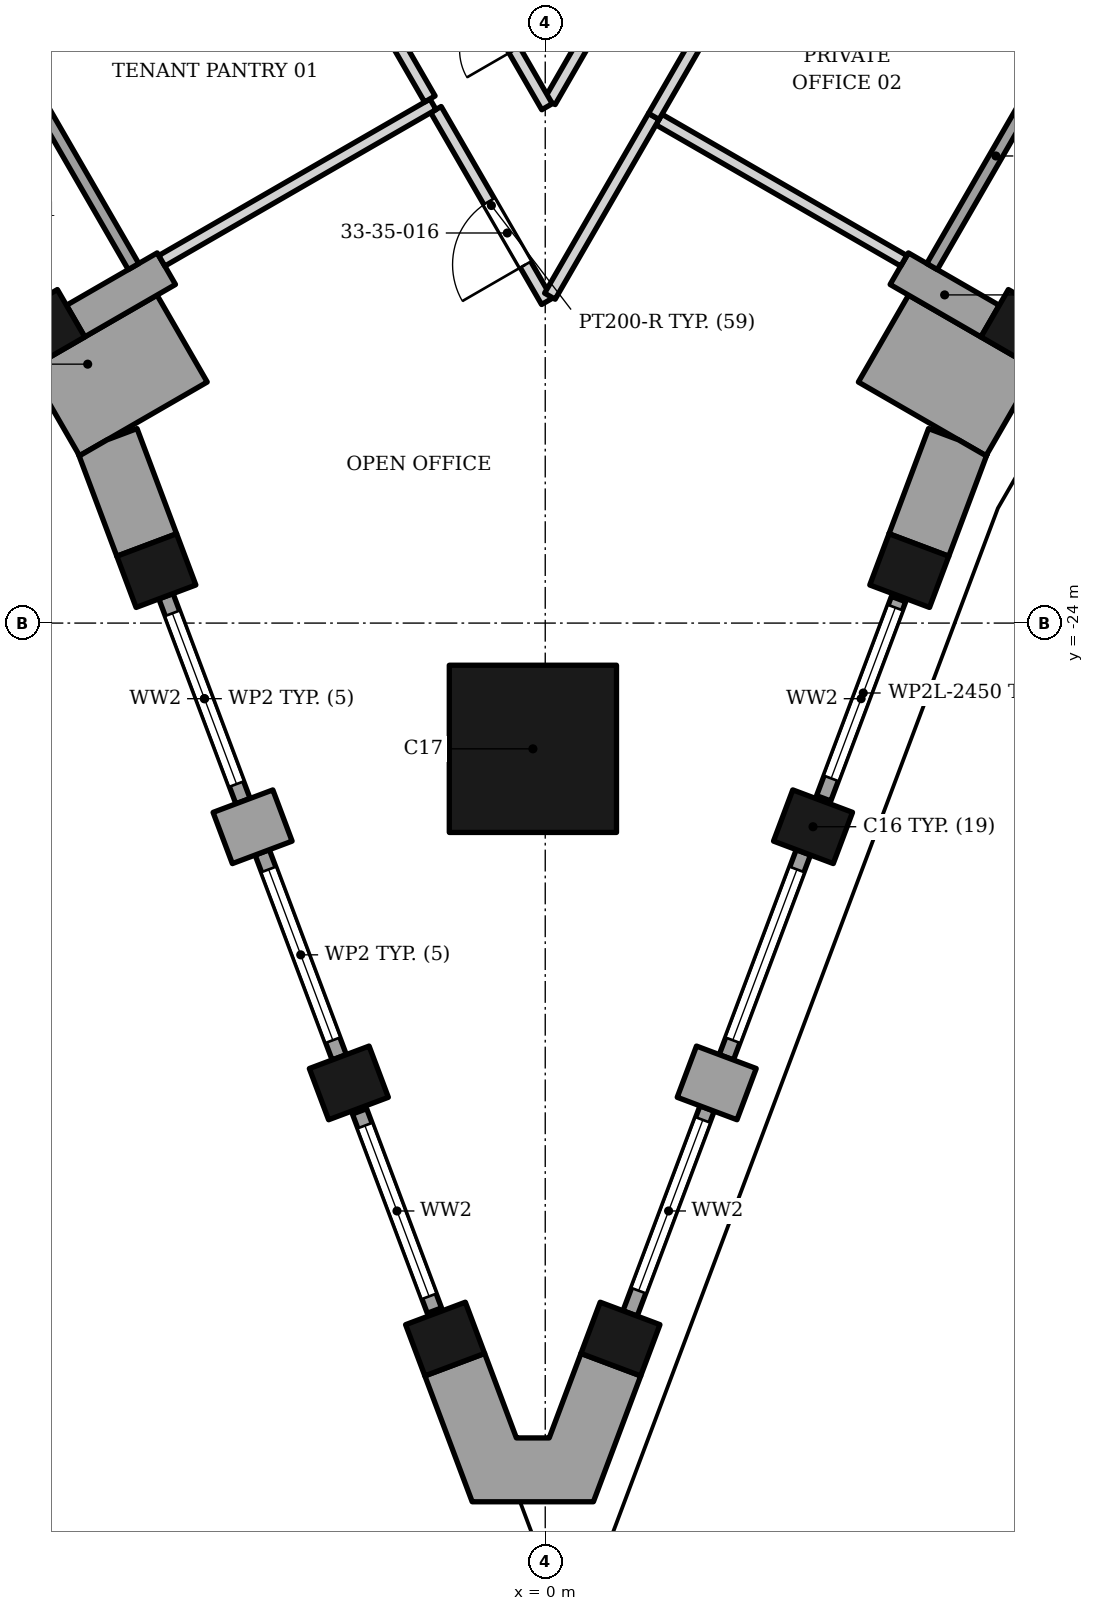
"""IFC4 building model, lengths in metres.
Left out: names, types, materials, properties, quantities, classifications, styles, units other than length and angle.
Written with IfcOpenShell. Run it as: python <this file> out.ifc"""

import sys

from ifc_helpers import new_model, si_unit, direction, frame, frame_2d, origin, origin_2d, place, context, subcontext, project, spatial, polyline, rectangle, outline, extrude, element, fill, save


model = new_model("IFC4")
c1 = context("Model", 3, precision=1e-05, world=origin(), true_north=direction((0.0, 1.0)))
c2 = subcontext(c1, "Body", "Model", "MODEL_VIEW")
j1 = project(units=[si_unit("LENGTHUNIT", "METRE"), si_unit("PLANEANGLEUNIT", "RADIAN")], contexts=[c1])
p1 = place(None, origin())
s1 = spatial("IfcSite", under=j1, at=p1, CompositionType="ELEMENT")
p2 = place(p1, origin())
s2 = spatial("IfcBuilding", under=s1, at=p2, CompositionType="ELEMENT")
p3 = place(p2, frame((0.0, 0.0, 144.6)))
s3 = spatial("IfcBuildingStorey", under=s2, at=p3, CompositionType="ELEMENT", Elevation=144.6)
p4 = place(p3, frame((-0.203, -26.068, 0.0), z_axis=(0.0, 0.0, 1.0), x_axis=(0.0, 1.0, 0.0)))
e1 = element("IfcColumn", 1, at=p4, inside=s3, PredefinedType="COLUMN", context=c2, shape_type="SweptSolid", body=[
    extrude(rectangle(XDim=2.75, YDim=2.75, at=origin_2d()), origin(), (0.0, 0.0, 1.0), 3.9),
])
for number, where, z_axis, x_axis in (
    (2, (-8.253, -19.167, 0.0), (0.0, 0.0, 1.0), (0.5, -0.866, 0.0)),
    (3, (-6.396, -23.137, 0.0), (0.0, 0.0, 1.0), (0.352, -0.936, 0.0)),
    (4, (-3.23, -31.562, 0.0), (0.0, 0.0, 1.0), (0.352, -0.936, 0.0)),
    (5, (-1.647, -35.774, 0.0), (0.0, 0.0, 1.0), (0.352, -0.936, 0.0)),
    (6, (1.237, -35.774, 0.0), (0.0, 0.0, 1.0), (0.352, 0.936, 0.0)),
    (7, (4.404, -27.349, 0.0), (0.0, 0.0, 1.0), (0.352, 0.936, 0.0)),
    (8, (5.987, -23.137, 0.0), (0.0, 0.0, 1.0), (0.352, 0.936, 0.0)),
    (9, (7.846, -19.167, 0.0), (0.0, 0.0, 1.0), (0.5, 0.866, 0.0)),
):
    element("IfcColumn", number, at=place(p3, frame(where, z_axis=z_axis, x_axis=x_axis)), inside=s3, PredefinedType="COLUMN", context=c2, shape_type="SweptSolid", body=[
        extrude(rectangle(XDim=0.9, YDim=1.05, at=origin_2d()), origin(), (0.0, 0.0, 1.0), 3.9),
    ])
p5 = place(p3, frame((-7.724, -19.033, 0.0), z_axis=(0.0, 0.0, 1.0), x_axis=(0.865985050045, 0.500069888215, 0.0)))
e10 = element("IfcWall", 10, at=p5, inside=s3, PredefinedType="SOLIDWALL", context=c2, shape_type="SweptSolid", body=[
    extrude(rectangle(XDim=1.723, YDim=0.6, at=frame_2d((0.862, 0.0))), origin(), (0.0, 0.0, 1.0), 3.0),
])
p6 = place(p3, frame((-8.871, -14.5, 0.0), z_axis=(0.0, 0.0, 1.0), x_axis=(0.499958946799, -0.866049104564, 0.0)))
e11 = element("IfcWall", 11, at=p6, inside=s3, PredefinedType="ELEMENTEDWALL", context=c2, shape_type="SweptSolid", body=[
    extrude(rectangle(XDim=4.2, YDim=0.2, at=frame_2d((2.1, 0.0))), origin(), (0.0, 0.0, 1.0), 3.0),
])
p7 = place(p3, frame((7.316, -19.034, 0.0), z_axis=(0.0, 0.0, 1.0), x_axis=(-0.866013532718, 0.500020560727, 0.0)))
e12 = element("IfcWall", 12, at=p7, inside=s3, PredefinedType="SOLIDWALL", context=c2, shape_type="SweptSolid", body=[
    extrude(rectangle(XDim=1.725, YDim=0.6, at=frame_2d((0.863, 0.0))), origin(), (0.0, 0.0, 1.0), 3.0),
])
p8 = place(p3, frame((6.362, -18.137, 0.0), z_axis=(0.0, 0.0, 1.0), x_axis=(0.500002543286, 0.866023935413, 0.0)))
e13 = element("IfcWall", 13, at=p8, inside=s3, PredefinedType="ELEMENTEDWALL", context=c2, shape_type="SweptSolid", body=[
    extrude(rectangle(XDim=4.2, YDim=0.2, at=frame_2d((2.1, 0.0))), origin(), (0.0, 0.0, 1.0), 3.0),
])
p9 = place(p3, origin())
e14 = element("IfcWall", 14, at=p9, inside=s3, PredefinedType="SOLIDWALL", context=c2, shape_type="SweptSolid", body=[
    extrude(outline(polyline([(-5.559, -20.036), (-6.385, -18.606), (-7.574, -19.293), (-7.573, -19.294), (-8.483, -19.819), (-8.483, -19.818), (-8.485, -19.819), (-7.659, -21.248), (-5.559, -20.036)])), origin(), (0.0, 0.0, 1.0), 3.0),
])
p10 = place(p3, origin())
e15 = element("IfcWall", 15, at=p10, inside=s3, PredefinedType="SOLIDWALL", context=c2, shape_type="SweptSolid", body=[
    extrude(outline(polyline([(8.075, -19.819), (5.975, -18.606), (5.15, -20.036), (7.25, -21.248), (8.075, -19.819)])), origin(), (0.0, 0.0, 1.0), 3.0),
])
p11 = place(p3, frame((-4.322, -27.165, 0.0), z_axis=(0.0, 0.0, 1.0), x_axis=(-0.936080509118, -0.351785844584, 0.0)))
e16 = element("IfcWall", 16, at=p11, inside=s3, PredefinedType="SOLIDWALL", context=c2, shape_type="SweptSolid", body=[
    extrude(rectangle(XDim=1.05, YDim=0.9, at=frame_2d((0.525, 0.0))), origin(), (0.0, 0.0, 1.0), 3.0),
])
p12 = place(p3, frame((-6.238, -23.558, 0.0), z_axis=(0.0, 0.0, 1.0), x_axis=(0.351829371284, -0.936064150314, 0.0)))
e17 = element("IfcWall", 17, at=p12, inside=s3, PredefinedType="ELEMENTEDWALL", context=c2, shape_type="SweptSolid", body=[
    extrude(rectangle(XDim=3.6, YDim=0.25, at=frame_2d((1.8, 0.0))), origin(), (0.0, 0.0, 1.0), 3.0),
])
p13 = place(p12, frame((0.3, 0.0, 0.3)))
e18 = element("IfcOpeningElement", 18, at=p13, cuts=e17, PredefinedType="OPENING", context=c2, shape_type="SweptSolid", body=[
    extrude(rectangle(XDim=3.0, YDim=2.5, at=frame_2d((1.5, 1.25))), frame((0.0, 0.135, 0.0), z_axis=(0.0, -1.0, 0.0), x_axis=(1.0, 0.0, 0.0)), (0.0, 0.0, 1.0), 0.27),
])
p14 = place(p3, frame((-4.655, -27.771, 0.0), z_axis=(0.0, 0.0, 1.0), x_axis=(0.351769947693, -0.936086483131, 0.0)))
e19 = element("IfcWall", 19, at=p14, inside=s3, PredefinedType="ELEMENTEDWALL", context=c2, shape_type="SweptSolid", body=[
    extrude(rectangle(XDim=3.6, YDim=0.25, at=frame_2d((1.8, 0.0))), origin(), (0.0, 0.0, 1.0), 3.0),
])
p15 = place(p14, frame((0.3, 0.0, 0.3)))
e20 = element("IfcOpeningElement", 20, at=p15, cuts=e19, PredefinedType="OPENING", context=c2, shape_type="SweptSolid", body=[
    extrude(rectangle(XDim=3.0, YDim=2.5, at=frame_2d((1.5, 1.25))), frame((0.0, 0.135, 0.0), z_axis=(0.0, -1.0, 0.0), x_axis=(1.0, 0.0, 0.0)), (0.0, 0.0, 1.0), 0.27),
])
p16 = place(p3, frame((-3.054, -32.03, 0.0), z_axis=(0.0, 0.0, 1.0), x_axis=(0.351826590602, -0.936065195457, 0.0)))
e21 = element("IfcWall", 21, at=p16, inside=s3, PredefinedType="ELEMENTEDWALL", context=c2, shape_type="SweptSolid", body=[
    extrude(rectangle(XDim=3.5, YDim=0.25, at=frame_2d((1.75, 0.0))), origin(), (0.0, 0.0, 1.0), 3.0),
])
p17 = place(p16, frame((0.25, 0.0, 0.3)))
e22 = element("IfcOpeningElement", 22, at=p17, cuts=e21, PredefinedType="OPENING", context=c2, shape_type="SweptSolid", body=[
    extrude(rectangle(XDim=3.0, YDim=2.5, at=frame_2d((1.5, 1.25))), frame((0.0, 0.135, 0.0), z_axis=(0.0, -1.0, 0.0), x_axis=(1.0, 0.0, 0.0)), (0.0, 0.0, 1.0), 0.27),
])
p18 = place(p3, frame((3.312, -31.747, 0.0), z_axis=(0.0, 0.0, 1.0), x_axis=(-0.936003928089, 0.351989554676, 0.0)))
e23 = element("IfcWall", 23, at=p18, inside=s3, PredefinedType="SOLIDWALL", context=c2, shape_type="SweptSolid", body=[
    extrude(rectangle(XDim=1.05, YDim=0.9, at=frame_2d((0.525, 0.0))), origin(), (0.0, 0.0, 1.0), 3.0),
])
p19 = place(p3, frame((1.396, -35.353, 0.0), z_axis=(0.0, 0.0, 1.0), x_axis=(0.351829371284, 0.936064150314, 0.0)))
e24 = element("IfcWall", 24, at=p19, inside=s3, PredefinedType="ELEMENTEDWALL", context=c2, shape_type="SweptSolid", body=[
    extrude(rectangle(XDim=3.6, YDim=0.25, at=frame_2d((1.8, 0.0))), origin(), (0.0, 0.0, 1.0), 3.0),
])
p20 = place(p19, frame((0.4, 0.0, 0.3)))
e25 = element("IfcOpeningElement", 25, at=p20, cuts=e24, PredefinedType="OPENING", context=c2, shape_type="SweptSolid", body=[
    extrude(rectangle(XDim=3.0, YDim=2.5, at=frame_2d((1.5, 1.25))), frame((0.0, 0.135, 0.0), z_axis=(0.0, -1.0, 0.0), x_axis=(1.0, 0.0, 0.0)), (0.0, 0.0, 1.0), 0.27),
])
p21 = place(p3, frame((2.979, -31.141, 0.0), z_axis=(0.0, 0.0, 1.0), x_axis=(0.351829371284, 0.936064150314, 0.0)))
e26 = element("IfcWall", 26, at=p21, inside=s3, PredefinedType="ELEMENTEDWALL", context=c2, shape_type="SweptSolid", body=[
    extrude(rectangle(XDim=3.6, YDim=0.25, at=frame_2d((1.8, 0.0))), origin(), (0.0, 0.0, 1.0), 3.0),
])
p22 = place(p21, frame((0.3, 0.0, 0.3)))
e27 = element("IfcOpeningElement", 27, at=p22, cuts=e26, PredefinedType="OPENING", context=c2, shape_type="SweptSolid", body=[
    extrude(rectangle(XDim=3.0, YDim=2.5, at=frame_2d((1.5, 1.25))), frame((0.0, 0.135, 0.0), z_axis=(0.0, -1.0, 0.0), x_axis=(1.0, 0.0, 0.0)), (0.0, 0.0, 1.0), 0.27),
])
p23 = place(p3, frame((4.579, -26.881, 0.0), z_axis=(0.0, 0.0, 1.0), x_axis=(0.351849563443, 0.936056560634, 0.0)))
e28 = element("IfcWall", 28, at=p23, inside=s3, PredefinedType="ELEMENTEDWALL", context=c2, shape_type="SweptSolid", body=[
    extrude(rectangle(XDim=3.5, YDim=0.25, at=frame_2d((1.75, 0.0))), origin(), (0.0, 0.0, 1.0), 2.95),
])
p24 = place(p23, frame((0.35, 0.0, 0.3)))
e29 = element("IfcOpeningElement", 29, at=p24, cuts=e28, PredefinedType="OPENING", context=c2, shape_type="SweptSolid", body=[
    extrude(rectangle(XDim=3.0, YDim=2.45, at=frame_2d((1.5, 1.225))), frame((0.0, 0.135, 0.0), z_axis=(0.0, -1.0, 0.0), x_axis=(1.0, 0.0, 0.0)), (0.0, 0.0, 1.0), 0.27),
])
p25 = place(p3, origin())
e30 = element("IfcWall", 30, at=p25, inside=s3, PredefinedType="SOLIDWALL", context=c2, shape_type="SweptSolid", body=[
    extrude(outline(polyline([(-6.063, -22.531), (-6.713, -20.801), (-7.205, -20.986), (-7.659, -21.248), (-7.681, -21.211), (-7.046, -22.901), (-7.046, -22.901), (-7.046, -22.9), (-6.063, -22.531)])), origin(), (0.0, 0.0, 1.0), 3.0),
])
p26 = place(p3, origin())
e31 = element("IfcWall", 31, at=p26, inside=s3, PredefinedType="SOLIDWALL", context=c2, shape_type="SweptSolid", body=[
    extrude(outline(polyline([(-0.474, -37.4), (-0.997, -36.01), (-1.98, -36.38), (-1.202, -38.45), (0.792, -38.45), (1.57, -36.38), (0.587, -36.01), (0.065, -37.4), (-0.474, -37.4)])), origin(), (0.0, 0.0, 1.0), 3.0),
])
p27 = place(p3, origin())
e32 = element("IfcWall", 32, at=p27, inside=s3, PredefinedType="SOLIDWALL", context=c2, shape_type="SweptSolid", body=[
    extrude(outline(polyline([(6.304, -20.801), (5.654, -22.531), (5.654, -22.531), (5.654, -22.531), (6.636, -22.9), (7.271, -21.211), (7.25, -21.248), (6.795, -20.986), (6.304, -20.801)])), origin(), (0.0, 0.0, 1.0), 3.0),
])
p28 = place(p3, frame((-1.798, -15.555, 0.0), z_axis=(0.0, 0.0, 1.0), x_axis=(0.500381369408, -0.865805108064, 0.0)))
e33 = element("IfcWall", 33, at=p28, inside=s3, PredefinedType="PARTITIONING", context=c2, shape_type="SweptSolid", body=[
    extrude(rectangle(XDim=3.645, YDim=0.2, at=frame_2d((1.823, 0.0))), origin(), (0.0, 0.0, 1.0), 3.128),
])
p29 = place(p28, frame((1.745, 0.0, 0.0)))
e34 = element("IfcOpeningElement", 34, at=p29, cuts=e33, PredefinedType="OPENING", context=c2, shape_type="SweptSolid", body=[
    extrude(rectangle(XDim=1.2, YDim=2.4, at=frame_2d((0.6, 1.2))), frame((0.0, 0.11, 0.0), z_axis=(0.0, -1.0, 0.0), x_axis=(1.0, 0.0, 0.0)), (0.0, 0.0, 1.0), 0.22),
])
p30 = place(p3, frame((1.869, -15.719, 0.0), z_axis=(0.0, 0.0, 1.0), x_axis=(0.866183837695, -0.499725483956, 0.0)))
e35 = element("IfcWall", 35, at=p30, inside=s3, PredefinedType="PARTITIONING", context=c2, shape_type="SweptSolid", body=[
    extrude(rectangle(XDim=4.649, YDim=0.2, at=frame_2d((2.325, 0.0))), origin(), (0.0, 0.0, 1.0), 3.052),
])
p31 = place(p3, frame((0.076, -18.624, 0.0), z_axis=(0.0, 0.0, 1.0), x_axis=(0.500452706258, 0.865763875892, 0.0)))
e36 = element("IfcWall", 36, at=p31, inside=s3, PredefinedType="PARTITIONING", context=c2, shape_type="SweptSolid", body=[
    extrude(rectangle(XDim=3.414, YDim=0.2, at=frame_2d((1.707, 0.0))), origin(), (0.0, 0.0, 1.0), 3.128),
])
p32 = place(p3, frame((-6.306, -18.042, 0.0), z_axis=(0.0, 0.0, 1.0), x_axis=(0.86617295725, 0.499744342768, 0.0)))
e37 = element("IfcWall", 37, at=p32, inside=s3, PredefinedType="PARTITIONING", context=c2, shape_type="SweptSolid", body=[
    extrude(rectangle(XDim=5.15, YDim=0.2, at=frame_2d((2.575, 0.0))), origin(), (0.0, 0.0, 1.0), 3.052),
])
p33 = place(p3, frame((0.076, -15.423, 0.0), z_axis=(0.0, 0.0, 1.0), x_axis=(0.499393409799, 0.866375335666, 0.0)))
e38 = element("IfcWall", 38, at=p33, inside=s3, PredefinedType="PARTITIONING", context=c2, shape_type="SweptSolid", body=[
    extrude(rectangle(XDim=11.306, YDim=0.2, at=frame_2d((5.653, 0.0))), origin(), (0.0, 0.0, 1.0), 2.884),
])
p34 = place(p33, frame((6.455, 0.0, 0.0)))
e39 = element("IfcOpeningElement", 39, at=p34, cuts=e38, PredefinedType="OPENING", context=c2, shape_type="SweptSolid", body=[
    extrude(rectangle(XDim=0.9, YDim=2.1, at=frame_2d((0.45, 1.05))), frame((0.0, 0.11, 0.0), z_axis=(0.0, -1.0, 0.0), x_axis=(1.0, 0.0, 0.0)), (0.0, 0.0, 1.0), 0.22),
])
p35 = place(p3, frame((-4.097, -11.573, 0.0), z_axis=(0.0, 0.0, 1.0), x_axis=(0.500013981145, -0.866017331616, 0.0)))
e40 = element("IfcWall", 40, at=p35, inside=s3, PredefinedType="PARTITIONING", context=c2, shape_type="SweptSolid", body=[
    extrude(rectangle(XDim=4.398, YDim=0.2, at=frame_2d((2.199, 0.0))), origin(), (0.0, 0.0, 1.0), 2.95),
])
p36 = place(p35, frame((1.798, 0.0, 0.0)))
e41 = element("IfcOpeningElement", 41, at=p36, cuts=e40, PredefinedType="OPENING", context=c2, shape_type="SweptSolid", body=[
    extrude(rectangle(XDim=0.9, YDim=2.1, at=frame_2d((0.45, 1.05))), frame((0.0, 0.11, 0.0), z_axis=(0.0, -1.0, 0.0), x_axis=(1.0, 0.0, 0.0)), (0.0, 0.0, 1.0), 0.22),
])
p37 = place(p3, frame((1.785, -15.668, 0.0), z_axis=(0.0, 0.0, 1.0), x_axis=(0.5000018851, 0.866024315419, 0.0)))
e42 = element("IfcWall", 42, at=p37, inside=s3, PredefinedType="PARTITIONING", context=c2, shape_type="SweptSolid", body=[
    extrude(rectangle(XDim=18.0, YDim=0.2, at=frame_2d((9.0, 0.0))), origin(), (0.0, 0.0, 1.0), 2.884),
])
p38 = place(p37, frame((1.8, 0.0, 0.0)))
e43 = element("IfcOpeningElement", 43, at=p38, cuts=e42, PredefinedType="OPENING", context=c2, shape_type="SweptSolid", body=[
    extrude(rectangle(XDim=0.9, YDim=2.1, at=frame_2d((0.45, 1.05))), frame((0.0, 0.11, 0.0), z_axis=(0.0, -1.0, 0.0), x_axis=(1.0, 0.0, 0.0)), (0.0, 0.0, 1.0), 0.22),
])
p39 = place(p37, frame((6.3, 0.0, 0.0)))
e44 = element("IfcOpeningElement", 44, at=p39, cuts=e42, PredefinedType="OPENING", context=c2, shape_type="SweptSolid", body=[
    extrude(rectangle(XDim=0.9, YDim=2.1, at=frame_2d((0.45, 1.05))), frame((0.0, 0.11, 0.0), z_axis=(0.0, -1.0, 0.0), x_axis=(1.0, 0.0, 0.0)), (0.0, 0.0, 1.0), 0.22),
])
p40 = place(p37, frame((13.0, 0.0, 0.0)))
e45 = element("IfcOpeningElement", 45, at=p40, cuts=e42, PredefinedType="OPENING", context=c2, shape_type="SweptSolid", body=[
    extrude(rectangle(XDim=1.0, YDim=2.1, at=frame_2d((0.5, 1.05))), frame((0.0, 0.11, 0.0), z_axis=(0.0, -1.0, 0.0), x_axis=(1.0, 0.0, 0.0)), (0.0, 0.0, 1.0), 0.22),
])
p41 = place(p3, frame((-11.064, 3.7, 0.0), z_axis=(0.0, 0.0, 1.0), x_axis=(0.500140059959, -0.865944525027, 0.0)))
e46 = element("IfcWall", 46, at=p41, inside=s3, PredefinedType="PARTITIONING", context=c2, shape_type="SweptSolid", body=[
    extrude(rectangle(XDim=22.181, YDim=0.2, at=frame_2d((11.091, 0.0))), origin(), (0.0, 0.0, 1.0), 2.884),
])
p42 = place(p41, frame((20.205, 0.0, 0.0)))
e47 = element("IfcOpeningElement", 47, at=p42, cuts=e46, PredefinedType="OPENING", context=c2, shape_type="SweptSolid", body=[
    extrude(rectangle(XDim=0.9, YDim=2.1, at=frame_2d((0.45, 1.05))), frame((0.0, 0.11, 0.0), z_axis=(0.0, -1.0, 0.0), x_axis=(1.0, 0.0, 0.0)), (0.0, 0.0, 1.0), 0.22),
])
p43 = place(p41, frame((14.5, 0.0, 0.0)))
e48 = element("IfcOpeningElement", 48, at=p43, cuts=e46, PredefinedType="OPENING", context=c2, shape_type="SweptSolid", body=[
    extrude(rectangle(XDim=0.9, YDim=2.1, at=frame_2d((0.45, 1.05))), frame((0.0, 0.11, 0.0), z_axis=(0.0, -1.0, 0.0), x_axis=(1.0, 0.0, 0.0)), (0.0, 0.0, 1.0), 0.22),
])
p44 = place(p41, frame((4.886, 0.0, 0.0)))
e49 = element("IfcOpeningElement", 49, at=p44, cuts=e46, PredefinedType="OPENING", context=c2, shape_type="SweptSolid", body=[
    extrude(rectangle(XDim=1.0, YDim=2.1, at=frame_2d((0.5, 1.05))), frame((0.0, 0.11, 0.0), z_axis=(0.0, -1.0, 0.0), x_axis=(1.0, 0.0, 0.0)), (0.0, 0.0, 1.0), 0.22),
])
p45 = place(p13, origin())
e50 = element("IfcWindow", 50, at=p45, inside=s3, PartitioningType="SINGLE_PANEL", PredefinedType="WINDOW", context=c2, shape_type="SweptSolid", body=[
    extrude(rectangle(XDim=3.0, YDim=2.5, at=frame_2d((1.5, 1.25))), frame((0.0, 0.03, 0.0), z_axis=(0.0, -1.0, 0.0), x_axis=(1.0, 0.0, 0.0)), (0.0, 0.0, 1.0), 0.06),
])
fill(e18, e50)
p46 = place(p15, origin())
e51 = element("IfcWindow", 51, at=p46, inside=s3, PartitioningType="SINGLE_PANEL", PredefinedType="WINDOW", context=c2, shape_type="SweptSolid", body=[
    extrude(rectangle(XDim=3.0, YDim=2.5, at=frame_2d((1.5, 1.25))), frame((0.0, 0.03, 0.0), z_axis=(0.0, -1.0, 0.0), x_axis=(1.0, 0.0, 0.0)), (0.0, 0.0, 1.0), 0.06),
])
fill(e20, e51)
p47 = place(p17, origin())
e52 = element("IfcWindow", 52, at=p47, inside=s3, PartitioningType="SINGLE_PANEL", PredefinedType="WINDOW", context=c2, shape_type="SweptSolid", body=[
    extrude(rectangle(XDim=3.0, YDim=2.5, at=frame_2d((1.5, 1.25))), frame((0.0, 0.03, 0.0), z_axis=(0.0, -1.0, 0.0), x_axis=(1.0, 0.0, 0.0)), (0.0, 0.0, 1.0), 0.06),
])
fill(e22, e52)
p48 = place(p20, origin())
e53 = element("IfcWindow", 53, at=p48, inside=s3, PartitioningType="SINGLE_PANEL", PredefinedType="WINDOW", context=c2, shape_type="SweptSolid", body=[
    extrude(rectangle(XDim=3.0, YDim=2.5, at=frame_2d((1.5, 1.25))), frame((0.0, 0.03, 0.0), z_axis=(0.0, -1.0, 0.0), x_axis=(1.0, 0.0, 0.0)), (0.0, 0.0, 1.0), 0.06),
])
fill(e25, e53)
p49 = place(p22, origin())
e54 = element("IfcWindow", 54, at=p49, inside=s3, PartitioningType="SINGLE_PANEL", PredefinedType="WINDOW", context=c2, shape_type="SweptSolid", body=[
    extrude(rectangle(XDim=3.0, YDim=2.5, at=frame_2d((1.5, 1.25))), frame((0.0, 0.03, 0.0), z_axis=(0.0, -1.0, 0.0), x_axis=(1.0, 0.0, 0.0)), (0.0, 0.0, 1.0), 0.06),
])
fill(e27, e54)
p50 = place(p24, origin())
e55 = element("IfcWindow", 55, at=p50, inside=s3, PartitioningType="SINGLE_PANEL", PredefinedType="WINDOW", context=c2, shape_type="SweptSolid", body=[
    extrude(rectangle(XDim=3.0, YDim=2.45, at=frame_2d((1.5, 1.225))), frame((0.0, 0.03, 0.0), z_axis=(0.0, -1.0, 0.0), x_axis=(1.0, 0.0, 0.0)), (0.0, 0.0, 1.0), 0.06),
])
fill(e29, e55)
p51 = place(p29, origin())
e56 = element("IfcDoor", 56, at=p51, inside=s3, OperationType="SINGLE_SWING_RIGHT", PredefinedType="DOOR", context=c2, shape_type="SweptSolid", body=[
    extrude(rectangle(XDim=1.2, YDim=2.4, at=frame_2d((0.6, 1.2))), frame((0.0, 0.025, 0.0), z_axis=(0.0, -1.0, 0.0), x_axis=(1.0, 0.0, 0.0)), (0.0, 0.0, 1.0), 0.05),
])
fill(e34, e56)
save(model, sys.argv[1])
